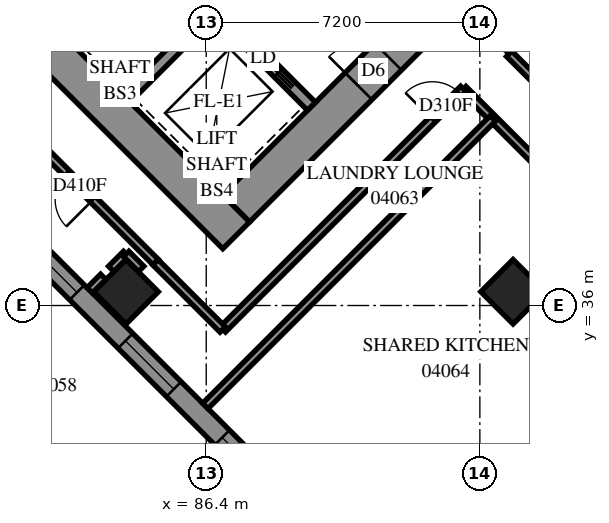
"""IFC4 building model, lengths in metres.
Left out: names, types, materials, properties, quantities, classifications, styles, units other than length and angle.
Written with IfcOpenShell. Run it as: python <this file> out.ifc"""

import sys

from ifc_helpers import new_model, si_unit, direction, frame, frame_2d, origin, origin_2d, place, context, subcontext, project, spatial, polyline, rectangle, outline, extrude, element, fill, save


model = new_model("IFC4")
c1 = context("Model", 3, precision=1e-05, world=origin(), true_north=direction((0.0, 1.0)))
c2 = subcontext(c1, "Body", "Model", "MODEL_VIEW")
j1 = project(units=[si_unit("LENGTHUNIT", "METRE"), si_unit("PLANEANGLEUNIT", "RADIAN")], contexts=[c1])
p1 = place(None, origin())
s1 = spatial("IfcSite", under=j1, at=p1, CompositionType="ELEMENT")
p2 = place(p1, origin())
s2 = spatial("IfcBuilding", under=s1, at=p2, CompositionType="ELEMENT")
p3 = place(p2, frame((0.0, 0.0, 18.6)))
s3 = spatial("IfcBuildingStorey", under=s2, at=p3, CompositionType="ELEMENT", Elevation=18.6)
for number, where, z_axis, x_axis in (
    (1, (84.291, 36.362, 0.0), (0.0, 0.0, 1.0), (0.707, -0.707, 0.0)),
    (2, (94.474, 36.362, 0.0), (0.0, 0.0, 1.0), (0.707, -0.707, 0.0)),
):
    element("IfcColumn", number, at=place(p3, frame(where, z_axis=z_axis, x_axis=x_axis)), inside=s3, PredefinedType="COLUMN", context=c2, shape_type="SweptSolid", body=[
        extrude(rectangle(XDim=1.2, YDim=1.2, at=origin_2d()), origin(), (0.0, 0.0, 1.0), 3.8),
    ])
p4 = place(p3, frame((75.594, 49.443, -0.4), z_axis=(0.0, 0.0, 1.0), x_axis=(0.7071037324, -0.70710983, 0.0)))
e3 = element("IfcWall", 3, at=p4, inside=s3, PredefinedType="SHEAR", context=c2, shape_type="SweptSolid", body=[
    extrude(rectangle(XDim=16.4, YDim=1.0, at=frame_2d((8.2, 0.0))), origin(), (0.0, 0.0, 1.0), 3.5),
])
p5 = place(p3, frame((87.19, 38.554, -0.4), z_axis=(0.0, 0.0, 1.0), x_axis=(0.707103309, 0.7071102534, 0.0)))
e4 = element("IfcWall", 4, at=p5, inside=s3, PredefinedType="SHEAR", context=c2, shape_type="SweptSolid", body=[
    extrude(rectangle(XDim=14.4, YDim=1.0, at=frame_2d((7.2, 0.0))), origin(), (0.0, 0.0, 1.0), 3.5),
])
p6 = place(p5, frame((4.55, 0.0, 0.4)))
e5 = element("IfcOpeningElement", 5, at=p6, cuts=e4, PredefinedType="OPENING", context=c2, shape_type="SweptSolid", body=[
    extrude(rectangle(XDim=1.1, YDim=2.1, at=frame_2d((0.55, 1.05))), frame((0.0, 0.51, 0.0), z_axis=(0.0, -1.0, 0.0), x_axis=(1.0, 0.0, 0.0)), (0.0, 0.0, 1.0), 1.02),
])
p7 = place(p5, frame((11.35, 0.0, 0.4)))
e6 = element("IfcOpeningElement", 6, at=p7, cuts=e4, PredefinedType="OPENING", context=c2, shape_type="SweptSolid", body=[
    extrude(rectangle(XDim=1.1, YDim=2.1, at=frame_2d((0.55, 1.05))), frame((0.0, 0.51, 0.0), z_axis=(0.0, -1.0, 0.0), x_axis=(1.0, 0.0, 0.0)), (0.0, 0.0, 1.0), 1.02),
])
p8 = place(p3, frame((84.291, 41.453, 0.0), z_axis=(0.0, 0.0, 1.0), x_axis=(0.7071067812, 0.7071067812, 0.0)))
e7 = element("IfcWall", 7, at=p8, inside=s3, PredefinedType="SOLIDWALL", context=c2, shape_type="SweptSolid", body=[
    extrude(rectangle(XDim=3.3, YDim=0.3, at=frame_2d((1.65, 0.0))), origin(), (0.0, 0.0, 1.0), 3.8),
])
p9 = place(p3, frame((78.988, 51.423, 0.0), z_axis=(0.0, 0.0, 1.0), x_axis=(0.7071067812, -0.7071067812, 0.0)))
e8 = element("IfcWall", 8, at=p9, inside=s3, PredefinedType="SOLIDWALL", context=c2, shape_type="SweptSolid", body=[
    extrude(rectangle(XDim=14.4, YDim=0.3, at=frame_2d((7.2, 0.0))), origin(), (0.0, 0.0, 1.0), 3.8),
])
p10 = place(p9, frame((1.25, 0.0, 0.0)))
e9 = element("IfcOpeningElement", 9, at=p10, cuts=e8, PredefinedType="OPENING", context=c2, shape_type="SweptSolid", body=[
    extrude(rectangle(XDim=1.1, YDim=2.1, at=frame_2d((0.55, 1.05))), frame((0.0, 0.16, 0.0), z_axis=(0.0, -1.0, 0.0), x_axis=(1.0, 0.0, 0.0)), (0.0, 0.0, 1.0), 0.32),
])
p11 = place(p9, frame((4.85, 0.0, 0.0)))
e10 = element("IfcOpeningElement", 10, at=p11, cuts=e8, PredefinedType="OPENING", context=c2, shape_type="SweptSolid", body=[
    extrude(rectangle(XDim=1.1, YDim=2.1, at=frame_2d((0.55, 1.05))), frame((0.0, 0.16, 0.0), z_axis=(0.0, -1.0, 0.0), x_axis=(1.0, 0.0, 0.0)), (0.0, 0.0, 1.0), 0.32),
])
p12 = place(p9, frame((8.45, 0.0, 0.0)))
e11 = element("IfcOpeningElement", 11, at=p12, cuts=e8, PredefinedType="OPENING", context=c2, shape_type="SweptSolid", body=[
    extrude(rectangle(XDim=1.1, YDim=2.1, at=frame_2d((0.55, 1.05))), frame((0.0, 0.16, 0.0), z_axis=(0.0, -1.0, 0.0), x_axis=(1.0, 0.0, 0.0)), (0.0, 0.0, 1.0), 0.32),
])
p13 = place(p9, frame((12.05, 0.0, 0.0)))
e12 = element("IfcOpeningElement", 12, at=p13, cuts=e8, PredefinedType="OPENING", context=c2, shape_type="SweptSolid", body=[
    extrude(rectangle(XDim=1.1, YDim=2.1, at=frame_2d((0.55, 1.05))), frame((0.0, 0.16, 0.0), z_axis=(0.0, -1.0, 0.0), x_axis=(1.0, 0.0, 0.0)), (0.0, 0.0, 1.0), 0.32),
])
p14 = place(p3, frame((117.843, 34.665, 0.0), z_axis=(0.0, 0.0, 1.0), x_axis=(-0.7071067812, 0.7071067812, 0.0)))
e13 = element("IfcWall", 13, at=p14, inside=s3, PredefinedType="SOLIDWALL", context=c2, shape_type="SweptSolid", body=[
    extrude(outline(polyline([(-0.275, -0.275), (54.222, -0.275), (53.994, 0.275), (0.275, 0.275), (-0.275, -0.275)])), origin(), (0.0, 0.0, 1.0), 3.8),
])
p15 = place(p14, frame((0.8, 0.0, 0.7)))
e14 = element("IfcOpeningElement", 14, at=p15, cuts=e13, PredefinedType="OPENING", context=c2, shape_type="SweptSolid", body=[
    extrude(rectangle(XDim=1.8, YDim=2.4, at=frame_2d((0.9, 1.2))), frame((0.0, 0.285, 0.0), z_axis=(0.0, -1.0, 0.0), x_axis=(1.0, 0.0, 0.0)), (0.0, 0.0, 1.0), 0.57),
])
p16 = place(p14, frame((4.225, 0.0, 0.7)))
e15 = element("IfcOpeningElement", 15, at=p16, cuts=e13, PredefinedType="OPENING", context=c2, shape_type="SweptSolid", body=[
    extrude(rectangle(XDim=1.8, YDim=2.4, at=frame_2d((0.9, 1.2))), frame((0.0, 0.285, 0.0), z_axis=(0.0, -1.0, 0.0), x_axis=(1.0, 0.0, 0.0)), (0.0, 0.0, 1.0), 0.57),
])
p17 = place(p14, frame((7.825, 0.0, 0.7)))
e16 = element("IfcOpeningElement", 16, at=p17, cuts=e13, PredefinedType="OPENING", context=c2, shape_type="SweptSolid", body=[
    extrude(rectangle(XDim=1.8, YDim=2.4, at=frame_2d((0.9, 1.2))), frame((0.0, 0.285, 0.0), z_axis=(0.0, -1.0, 0.0), x_axis=(1.0, 0.0, 0.0)), (0.0, 0.0, 1.0), 0.57),
])
p18 = place(p14, frame((11.425, 0.0, 0.7)))
e17 = element("IfcOpeningElement", 17, at=p18, cuts=e13, PredefinedType="OPENING", context=c2, shape_type="SweptSolid", body=[
    extrude(rectangle(XDim=1.8, YDim=2.4, at=frame_2d((0.9, 1.2))), frame((0.0, 0.285, 0.0), z_axis=(0.0, -1.0, 0.0), x_axis=(1.0, 0.0, 0.0)), (0.0, 0.0, 1.0), 0.57),
])
p19 = place(p14, frame((15.025, 0.0, 0.7)))
e18 = element("IfcOpeningElement", 18, at=p19, cuts=e13, PredefinedType="OPENING", context=c2, shape_type="SweptSolid", body=[
    extrude(rectangle(XDim=1.8, YDim=2.4, at=frame_2d((0.9, 1.2))), frame((0.0, 0.285, 0.0), z_axis=(0.0, -1.0, 0.0), x_axis=(1.0, 0.0, 0.0)), (0.0, 0.0, 1.0), 0.57),
])
p20 = place(p14, frame((18.625, 0.0, 0.7)))
e19 = element("IfcOpeningElement", 19, at=p20, cuts=e13, PredefinedType="OPENING", context=c2, shape_type="SweptSolid", body=[
    extrude(rectangle(XDim=1.8, YDim=2.4, at=frame_2d((0.9, 1.2))), frame((0.0, 0.285, 0.0), z_axis=(0.0, -1.0, 0.0), x_axis=(1.0, 0.0, 0.0)), (0.0, 0.0, 1.0), 0.57),
])
p21 = place(p14, frame((22.225, 0.0, 0.7)))
e20 = element("IfcOpeningElement", 20, at=p21, cuts=e13, PredefinedType="OPENING", context=c2, shape_type="SweptSolid", body=[
    extrude(rectangle(XDim=1.8, YDim=2.4, at=frame_2d((0.9, 1.2))), frame((0.0, 0.285, 0.0), z_axis=(0.0, -1.0, 0.0), x_axis=(1.0, 0.0, 0.0)), (0.0, 0.0, 1.0), 0.57),
])
p22 = place(p14, frame((25.825, 0.0, 0.7)))
e21 = element("IfcOpeningElement", 21, at=p22, cuts=e13, PredefinedType="OPENING", context=c2, shape_type="SweptSolid", body=[
    extrude(rectangle(XDim=1.8, YDim=2.4, at=frame_2d((0.9, 1.2))), frame((0.0, 0.285, 0.0), z_axis=(0.0, -1.0, 0.0), x_axis=(1.0, 0.0, 0.0)), (0.0, 0.0, 1.0), 0.57),
])
p23 = place(p14, frame((29.425, 0.0, 0.7)))
e22 = element("IfcOpeningElement", 22, at=p23, cuts=e13, PredefinedType="OPENING", context=c2, shape_type="SweptSolid", body=[
    extrude(rectangle(XDim=1.8, YDim=2.4, at=frame_2d((0.9, 1.2))), frame((0.0, 0.285, 0.0), z_axis=(0.0, -1.0, 0.0), x_axis=(1.0, 0.0, 0.0)), (0.0, 0.0, 1.0), 0.57),
])
p24 = place(p14, frame((33.025, 0.0, 0.7)))
e23 = element("IfcOpeningElement", 23, at=p24, cuts=e13, PredefinedType="OPENING", context=c2, shape_type="SweptSolid", body=[
    extrude(rectangle(XDim=1.8, YDim=2.4, at=frame_2d((0.9, 1.2))), frame((0.0, 0.285, 0.0), z_axis=(0.0, -1.0, 0.0), x_axis=(1.0, 0.0, 0.0)), (0.0, 0.0, 1.0), 0.57),
])
p25 = place(p14, frame((36.625, 0.0, 0.7)))
e24 = element("IfcOpeningElement", 24, at=p25, cuts=e13, PredefinedType="OPENING", context=c2, shape_type="SweptSolid", body=[
    extrude(rectangle(XDim=1.8, YDim=2.4, at=frame_2d((0.9, 1.2))), frame((0.0, 0.285, 0.0), z_axis=(0.0, -1.0, 0.0), x_axis=(1.0, 0.0, 0.0)), (0.0, 0.0, 1.0), 0.57),
])
p26 = place(p14, frame((40.225, 0.0, 0.7)))
e25 = element("IfcOpeningElement", 25, at=p26, cuts=e13, PredefinedType="OPENING", context=c2, shape_type="SweptSolid", body=[
    extrude(rectangle(XDim=1.8, YDim=2.4, at=frame_2d((0.9, 1.2))), frame((0.0, 0.285, 0.0), z_axis=(0.0, -1.0, 0.0), x_axis=(1.0, 0.0, 0.0)), (0.0, 0.0, 1.0), 0.57),
])
p27 = place(p14, frame((43.825, 0.0, 0.7)))
e26 = element("IfcOpeningElement", 26, at=p27, cuts=e13, PredefinedType="OPENING", context=c2, shape_type="SweptSolid", body=[
    extrude(rectangle(XDim=1.8, YDim=2.4, at=frame_2d((0.9, 1.2))), frame((0.0, 0.285, 0.0), z_axis=(0.0, -1.0, 0.0), x_axis=(1.0, 0.0, 0.0)), (0.0, 0.0, 1.0), 0.57),
])
p28 = place(p14, frame((47.425, 0.0, 0.7)))
e27 = element("IfcOpeningElement", 27, at=p28, cuts=e13, PredefinedType="OPENING", context=c2, shape_type="SweptSolid", body=[
    extrude(rectangle(XDim=1.8, YDim=2.4, at=frame_2d((0.9, 1.2))), frame((0.0, 0.285, 0.0), z_axis=(0.0, -1.0, 0.0), x_axis=(1.0, 0.0, 0.0)), (0.0, 0.0, 1.0), 0.57),
])
p29 = place(p14, frame((51.06, 0.0, 0.7)))
e28 = element("IfcOpeningElement", 28, at=p29, cuts=e13, PredefinedType="OPENING", context=c2, shape_type="SweptSolid", body=[
    extrude(rectangle(XDim=1.8, YDim=2.4, at=frame_2d((0.9, 1.2))), frame((0.0, 0.285, 0.0), z_axis=(0.0, -1.0, 0.0), x_axis=(1.0, 0.0, 0.0)), (0.0, 0.0, 1.0), 0.57),
])
p30 = place(p3, frame((77.07, 42.275, 0.0), z_axis=(0.0, 0.0, 1.0), x_axis=(0.7071067812, -0.7071067812, 0.0)))
e29 = element("IfcWall", 29, at=p30, inside=s3, PredefinedType="SOLIDWALL", context=c2, shape_type="SweptSolid", body=[
    extrude(outline(polyline([(0.114, -0.275), (39.288, -0.275), (38.737, 0.275), (-0.114, 0.275), (0.114, -0.275)])), origin(), (0.0, 0.0, 1.0), 3.8),
])
p31 = place(p30, frame((2.837, 0.0, 0.7)))
e30 = element("IfcOpeningElement", 30, at=p31, cuts=e29, PredefinedType="OPENING", context=c2, shape_type="SweptSolid", body=[
    extrude(rectangle(XDim=1.8, YDim=2.4, at=frame_2d((0.9, 1.2))), frame((0.0, 0.285, 0.0), z_axis=(0.0, -1.0, 0.0), x_axis=(1.0, 0.0, 0.0)), (0.0, 0.0, 1.0), 0.57),
])
p32 = place(p30, frame((6.588, 0.0, 0.7)))
e31 = element("IfcOpeningElement", 31, at=p32, cuts=e29, PredefinedType="OPENING", context=c2, shape_type="SweptSolid", body=[
    extrude(rectangle(XDim=1.8, YDim=2.4, at=frame_2d((0.9, 1.2))), frame((0.0, 0.285, 0.0), z_axis=(0.0, -1.0, 0.0), x_axis=(1.0, 0.0, 0.0)), (0.0, 0.0, 1.0), 0.57),
])
p33 = place(p30, frame((10.188, 0.0, 0.7)))
e32 = element("IfcOpeningElement", 32, at=p33, cuts=e29, PredefinedType="OPENING", context=c2, shape_type="SweptSolid", body=[
    extrude(rectangle(XDim=1.8, YDim=2.4, at=frame_2d((0.9, 1.2))), frame((0.0, 0.285, 0.0), z_axis=(0.0, -1.0, 0.0), x_axis=(1.0, 0.0, 0.0)), (0.0, 0.0, 1.0), 0.57),
])
p34 = place(p30, frame((13.787, 0.0, 0.7)))
e33 = element("IfcOpeningElement", 33, at=p34, cuts=e29, PredefinedType="OPENING", context=c2, shape_type="SweptSolid", body=[
    extrude(rectangle(XDim=1.8, YDim=2.4, at=frame_2d((0.9, 1.2))), frame((0.0, 0.285, 0.0), z_axis=(0.0, -1.0, 0.0), x_axis=(1.0, 0.0, 0.0)), (0.0, 0.0, 1.0), 0.57),
])
p35 = place(p30, frame((17.387, 0.0, 0.7)))
e34 = element("IfcOpeningElement", 34, at=p35, cuts=e29, PredefinedType="OPENING", context=c2, shape_type="SweptSolid", body=[
    extrude(rectangle(XDim=1.8, YDim=2.4, at=frame_2d((0.9, 1.2))), frame((0.0, 0.285, 0.0), z_axis=(0.0, -1.0, 0.0), x_axis=(1.0, 0.0, 0.0)), (0.0, 0.0, 1.0), 0.57),
])
p36 = place(p30, frame((20.988, 0.0, 0.7)))
e35 = element("IfcOpeningElement", 35, at=p36, cuts=e29, PredefinedType="OPENING", context=c2, shape_type="SweptSolid", body=[
    extrude(rectangle(XDim=1.8, YDim=2.4, at=frame_2d((0.9, 1.2))), frame((0.0, 0.285, 0.0), z_axis=(0.0, -1.0, 0.0), x_axis=(1.0, 0.0, 0.0)), (0.0, 0.0, 1.0), 0.57),
])
p37 = place(p30, frame((24.587, 0.0, 0.7)))
e36 = element("IfcOpeningElement", 36, at=p37, cuts=e29, PredefinedType="OPENING", context=c2, shape_type="SweptSolid", body=[
    extrude(rectangle(XDim=1.8, YDim=2.4, at=frame_2d((0.9, 1.2))), frame((0.0, 0.285, 0.0), z_axis=(0.0, -1.0, 0.0), x_axis=(1.0, 0.0, 0.0)), (0.0, 0.0, 1.0), 0.57),
])
p38 = place(p30, frame((28.188, 0.0, 0.7)))
e37 = element("IfcOpeningElement", 37, at=p38, cuts=e29, PredefinedType="OPENING", context=c2, shape_type="SweptSolid", body=[
    extrude(rectangle(XDim=1.8, YDim=2.4, at=frame_2d((0.9, 1.2))), frame((0.0, 0.285, 0.0), z_axis=(0.0, -1.0, 0.0), x_axis=(1.0, 0.0, 0.0)), (0.0, 0.0, 1.0), 0.57),
])
p39 = place(p30, frame((31.788, 0.0, 0.7)))
e38 = element("IfcOpeningElement", 38, at=p39, cuts=e29, PredefinedType="OPENING", context=c2, shape_type="SweptSolid", body=[
    extrude(rectangle(XDim=1.8, YDim=2.4, at=frame_2d((0.9, 1.2))), frame((0.0, 0.285, 0.0), z_axis=(0.0, -1.0, 0.0), x_axis=(1.0, 0.0, 0.0)), (0.0, 0.0, 1.0), 0.57),
])
p40 = place(p30, frame((35.388, 0.0, 0.7)))
e39 = element("IfcOpeningElement", 39, at=p40, cuts=e29, PredefinedType="OPENING", context=c2, shape_type="SweptSolid", body=[
    extrude(rectangle(XDim=1.8, YDim=2.4, at=frame_2d((0.9, 1.2))), frame((0.0, 0.285, 0.0), z_axis=(0.0, -1.0, 0.0), x_axis=(1.0, 0.0, 0.0)), (0.0, 0.0, 1.0), 0.57),
])
p41 = place(p3, frame((93.163, 41.697, 0.0), z_axis=(0.0, 0.0, 1.0), x_axis=(0.7071067812, -0.7071067812, 0.0)))
e40 = element("IfcWall", 40, at=p41, inside=s3, PredefinedType="PARTITIONING", context=c2, shape_type="SweptSolid", body=[
    extrude(rectangle(XDim=26.299, YDim=0.2, at=frame_2d((13.149, 0.0))), origin(), (0.0, 0.0, 1.0), 3.8),
])
p42 = place(p41, frame((3.437, 0.0, 0.0)))
e41 = element("IfcOpeningElement", 41, at=p42, cuts=e40, PredefinedType="OPENING", context=c2, shape_type="SweptSolid", body=[
    extrude(rectangle(XDim=1.0, YDim=2.1, at=frame_2d((0.5, 1.05))), frame((0.0, 0.11, 0.0), z_axis=(0.0, -1.0, 0.0), x_axis=(1.0, 0.0, 0.0)), (0.0, 0.0, 1.0), 0.22),
])
p43 = place(p41, frame((10.637, 0.0, 0.0)))
e42 = element("IfcOpeningElement", 42, at=p43, cuts=e40, PredefinedType="OPENING", context=c2, shape_type="SweptSolid", body=[
    extrude(rectangle(XDim=1.0, YDim=2.1, at=frame_2d((0.5, 1.05))), frame((0.0, 0.11, 0.0), z_axis=(0.0, -1.0, 0.0), x_axis=(1.0, 0.0, 0.0)), (0.0, 0.0, 1.0), 0.22),
])
p44 = place(p41, frame((16.024, 0.0, 0.0)))
e43 = element("IfcOpeningElement", 43, at=p44, cuts=e40, PredefinedType="OPENING", context=c2, shape_type="SweptSolid", body=[
    extrude(rectangle(XDim=1.0, YDim=2.1, at=frame_2d((0.5, 1.05))), frame((0.0, 0.11, 0.0), z_axis=(0.0, -1.0, 0.0), x_axis=(1.0, 0.0, 0.0)), (0.0, 0.0, 1.0), 0.22),
])
p45 = place(p41, frame((22.657, 0.0, 0.0)))
e44 = element("IfcOpeningElement", 44, at=p45, cuts=e40, PredefinedType="OPENING", context=c2, shape_type="SweptSolid", body=[
    extrude(rectangle(XDim=1.0, YDim=2.1, at=frame_2d((0.5, 1.05))), frame((0.0, 0.11, 0.0), z_axis=(0.0, -1.0, 0.0), x_axis=(1.0, 0.0, 0.0)), (0.0, 0.0, 1.0), 0.22),
])
p46 = place(p3, frame((86.376, 33.357, 0.0), z_axis=(0.0, 0.0, 1.0), x_axis=(0.7071021083, 0.707111454, 0.0)))
e45 = element("IfcWall", 45, at=p46, inside=s3, PredefinedType="PARTITIONING", context=c2, shape_type="SweptSolid", body=[
    extrude(rectangle(XDim=10.7, YDim=0.2, at=frame_2d((5.35, 0.0))), origin(), (0.0, 0.0, 1.0), 3.8),
])
p47 = place(p3, frame((91.468, 28.266, 0.0), z_axis=(0.0, 0.0, 1.0), x_axis=(0.7071067812, 0.7071067812, 0.0)))
e46 = element("IfcWall", 46, at=p47, inside=s3, PredefinedType="PARTITIONING", context=c2, shape_type="SweptSolid", body=[
    extrude(rectangle(XDim=10.7, YDim=0.2, at=frame_2d((5.35, 0.0))), origin(), (0.0, 0.0, 1.0), 3.8),
])
p48 = place(p3, frame((86.836, 35.372, 0.0), z_axis=(0.0, 0.0, 1.0), x_axis=(0.7071067812, 0.7071067812, 0.0)))
e47 = element("IfcWall", 47, at=p48, inside=s3, PredefinedType="PARTITIONING", context=c2, shape_type="SweptSolid", body=[
    extrude(rectangle(XDim=8.949, YDim=0.2, at=frame_2d((4.474, 0.0))), origin(), (0.0, 0.0, 1.0), 3.8),
])
p49 = place(p48, frame((7.8, 0.0, 0.0)))
e48 = element("IfcOpeningElement", 48, at=p49, cuts=e47, PredefinedType="OPENING", context=c2, shape_type="SweptSolid", body=[
    extrude(rectangle(XDim=1.0, YDim=2.1, at=frame_2d((0.5, 1.05))), frame((0.0, 0.11, 0.0), z_axis=(0.0, -1.0, 0.0), x_axis=(1.0, 0.0, 0.0)), (0.0, 0.0, 1.0), 0.22),
])
p50 = place(p3, frame((94.371, 42.623, 0.0), z_axis=(0.0, 0.0, 1.0), x_axis=(0.7071067812, -0.7071067812, 0.0)))
e49 = element("IfcWall", 49, at=p50, inside=s3, PredefinedType="PARTITIONING", context=c2, shape_type="SweptSolid", body=[
    extrude(outline(polyline([(0.0, -0.1), (11.7, -0.1), (11.7, 0.1), (0.0, 0.1), (0.0, -0.1)])), origin(), (0.0, 0.0, 1.0), 3.8),
])
p51 = place(p50, frame((3.274, 0.0, 0.0)))
e50 = element("IfcOpeningElement", 50, at=p51, cuts=e49, PredefinedType="OPENING", context=c2, shape_type="SweptSolid", body=[
    extrude(rectangle(XDim=1.0, YDim=2.1, at=frame_2d((0.5, 1.05))), frame((0.0, 0.11, 0.0), z_axis=(0.0, -1.0, 0.0), x_axis=(1.0, 0.0, 0.0)), (0.0, 0.0, 1.0), 0.22),
])
p52 = place(p50, frame((10.473, 0.0, 0.0)))
e51 = element("IfcOpeningElement", 51, at=p52, cuts=e49, PredefinedType="OPENING", context=c2, shape_type="SweptSolid", body=[
    extrude(rectangle(XDim=1.0, YDim=2.1, at=frame_2d((0.5, 1.05))), frame((0.0, 0.11, 0.0), z_axis=(0.0, -1.0, 0.0), x_axis=(1.0, 0.0, 0.0)), (0.0, 0.0, 1.0), 0.22),
])
p53 = place(p3, frame((85.07, 37.142, 0.0), z_axis=(0.0, 0.0, 1.0), x_axis=(-0.7070899851, 0.7071235769, 0.0)))
e52 = element("IfcWall", 52, at=p53, inside=s3, PredefinedType="PARTITIONING", context=c2, shape_type="SweptSolid", body=[
    extrude(rectangle(XDim=5.954, YDim=0.2, at=frame_2d((2.977, 0.0))), origin(), (0.0, 0.0, 1.0), 3.8),
])
p54 = place(p53, frame((2.326, 0.0, 0.0)))
e53 = element("IfcOpeningElement", 53, at=p54, cuts=e52, PredefinedType="OPENING", context=c2, shape_type="SweptSolid", body=[
    extrude(rectangle(XDim=1.0, YDim=2.1, at=frame_2d((0.5, 1.05))), frame((0.0, 0.11, 0.0), z_axis=(0.0, -1.0, 0.0), x_axis=(1.0, 0.0, 0.0)), (0.0, 0.0, 1.0), 0.22),
])
p55 = place(p3, frame((85.065, 37.137, 0.0), z_axis=(0.0, 0.0, 1.0), x_axis=(0.7071067812, -0.7071067812, 0.0)))
e54 = element("IfcWall", 54, at=p55, inside=s3, PredefinedType="PARTITIONING", context=c2, shape_type="SweptSolid", body=[
    extrude(rectangle(XDim=2.5, YDim=0.2, at=frame_2d((1.25, 0.0))), origin(), (0.0, 0.0, 1.0), 3.8),
])
for number, where, z_axis, x_axis in (
    (55, (83.9, 36.962, 0.0), (0.0, 0.0, 1.0), (0.707, 0.707, 0.0)),
    (56, (84.294, 37.356, 0.0), (0.0, 0.0, 1.0), (0.707, -0.707, 0.0)),
):
    element("IfcWall", number, at=place(p3, frame(where, z_axis=z_axis, x_axis=x_axis)), inside=s3, PredefinedType="PARTITIONING", context=c2, shape_type="SweptSolid", body=[
        extrude(rectangle(XDim=0.557, YDim=0.2, at=frame_2d((0.279, 0.0))), origin(), (0.0, 0.0, 1.0), 3.8),
    ])
p56 = place(p3, frame((83.336, 36.398, 0.0), z_axis=(0.0, 0.0, 1.0), x_axis=(0.7072060451, 0.7070075033, 0.0)))
e57 = element("IfcWall", 57, at=p56, inside=s3, PredefinedType="PARTITIONING", context=c2, shape_type="SweptSolid", body=[
    extrude(rectangle(XDim=0.504, YDim=0.2, at=frame_2d((0.252, 0.0))), origin(), (0.0, 0.0, 1.0), 3.8),
])
p57 = place(p32, origin())
e58 = element("IfcWindow", 58, at=p57, inside=s3, PartitioningType="SINGLE_PANEL", PredefinedType="WINDOW", context=c2, shape_type="SweptSolid", body=[
    extrude(rectangle(XDim=1.8, YDim=2.4, at=frame_2d((0.9, 1.2))), frame((0.0, 0.155, 0.0), z_axis=(0.0, -1.0, 0.0), x_axis=(1.0, 0.0, 0.0)), (0.0, 0.0, 1.0), 0.06),
])
fill(e31, e58)
p58 = place(p33, origin())
e59 = element("IfcWindow", 59, at=p58, inside=s3, PartitioningType="SINGLE_PANEL", PredefinedType="WINDOW", context=c2, shape_type="SweptSolid", body=[
    extrude(rectangle(XDim=1.8, YDim=2.4, at=frame_2d((0.9, 1.2))), frame((0.0, 0.155, 0.0), z_axis=(0.0, -1.0, 0.0), x_axis=(1.0, 0.0, 0.0)), (0.0, 0.0, 1.0), 0.06),
])
fill(e32, e59)
p59 = place(p34, origin())
e60 = element("IfcWindow", 60, at=p59, inside=s3, PartitioningType="SINGLE_PANEL", PredefinedType="WINDOW", context=c2, shape_type="SweptSolid", body=[
    extrude(rectangle(XDim=1.8, YDim=2.4, at=frame_2d((0.9, 1.2))), frame((0.0, 0.155, 0.0), z_axis=(0.0, -1.0, 0.0), x_axis=(1.0, 0.0, 0.0)), (0.0, 0.0, 1.0), 0.06),
])
fill(e33, e60)
p60 = place(p6, origin())
e61 = element("IfcDoor", 61, at=p60, inside=s3, OperationType="DOUBLE_DOOR_SINGLE_SWING", PredefinedType="DOOR", context=c2, shape_type="SweptSolid", body=[
    extrude(rectangle(XDim=1.1, YDim=2.1, at=frame_2d((0.55, 1.05))), frame((0.0, 0.025, 0.0), z_axis=(0.0, -1.0, 0.0), x_axis=(1.0, 0.0, 0.0)), (0.0, 0.0, 1.0), 0.05),
])
fill(e5, e61)
p61 = place(p13, origin())
e62 = element("IfcDoor", 62, at=p61, inside=s3, OperationType="SLIDING_TO_RIGHT", PredefinedType="DOOR", context=c2, shape_type="SweptSolid", body=[
    extrude(rectangle(XDim=1.1, YDim=2.1, at=frame_2d((0.55, 1.05))), frame((0.0, 0.025, 0.0), z_axis=(0.0, -1.0, 0.0), x_axis=(1.0, 0.0, 0.0)), (0.0, 0.0, 1.0), 0.05),
])
fill(e12, e62)
p62 = place(p54, origin())
e63 = element("IfcDoor", 63, at=p62, inside=s3, OperationType="SINGLE_SWING_RIGHT", PredefinedType="DOOR", context=c2, shape_type="SweptSolid", body=[
    extrude(rectangle(XDim=1.0, YDim=2.1, at=frame_2d((0.5, 1.05))), frame((0.0, 0.025, 0.0), z_axis=(0.0, -1.0, 0.0), x_axis=(1.0, 0.0, 0.0)), (0.0, 0.0, 1.0), 0.05),
])
fill(e53, e63)
p63 = place(p49, origin())
e64 = element("IfcDoor", 64, at=p63, inside=s3, OperationType="SINGLE_SWING_RIGHT", PredefinedType="DOOR", context=c2, shape_type="SweptSolid", body=[
    extrude(rectangle(XDim=1.0, YDim=2.1, at=frame_2d((0.5, 1.05))), frame((0.0, 0.025, 0.0), z_axis=(0.0, -1.0, 0.0), x_axis=(1.0, 0.0, 0.0)), (0.0, 0.0, 1.0), 0.05),
])
fill(e48, e64)
save(model, sys.argv[1])
